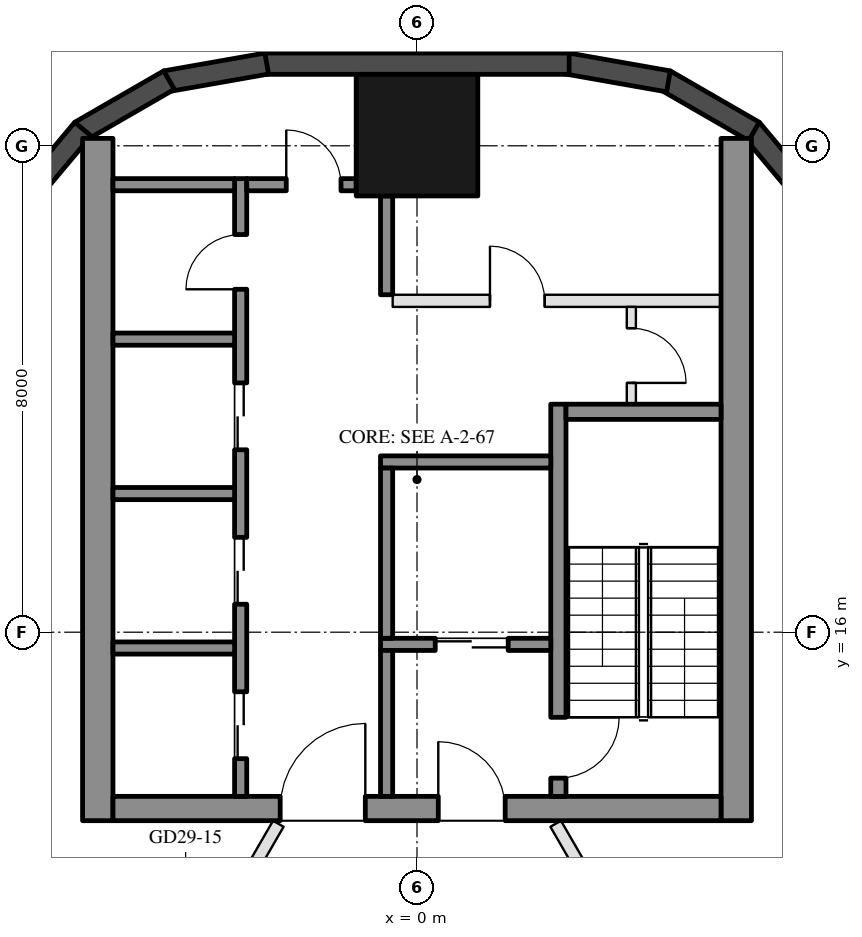
"""IFC4 building model, lengths in metres.
Left out: names, types, materials, properties, quantities, classifications, styles, units other than length and angle.
Written with IfcOpenShell. Run it as: python <this file> out.ifc"""

import sys

from ifc_helpers import new_model, si_unit, direction, frame, frame_2d, origin, origin_2d, place, context, subcontext, project, spatial, rectangle, hollow_rectangle, extrude, boolean, halfspace, element, fill, save


model = new_model("IFC4")
c1 = context("Model", 3, precision=1e-05, world=origin(), true_north=direction((0.0, 1.0)))
c2 = subcontext(c1, "Body", "Model", "MODEL_VIEW")
j1 = project(units=[si_unit("LENGTHUNIT", "METRE"), si_unit("PLANEANGLEUNIT", "RADIAN")], contexts=[c1])
p1 = place(None, origin())
s1 = spatial("IfcSite", under=j1, at=p1, CompositionType="ELEMENT")
p2 = place(p1, origin())
s2 = spatial("IfcBuilding", under=s1, at=p2, CompositionType="ELEMENT")
p3 = place(p2, frame((0.0, 0.0, 291.1)))
s3 = spatial("IfcBuildingStorey", under=s2, at=p3, CompositionType="ELEMENT", Elevation=291.1)
p4 = place(p3, frame((0.0, 24.175, 0.0), z_axis=(0.0, 0.0, 1.0), x_axis=(1.0, 0.0, 0.0)))
e1 = element("IfcColumn", 1, at=p4, inside=s3, PredefinedType="COLUMN", context=c2, shape_type="SweptSolid", body=[
    boolean("DIFFERENCE", extrude(hollow_rectangle(XDim=2.0, YDim=2.0, WallThickness=0.05, at=origin_2d()), origin(), (0.0, 0.0, 1.0), 3.7), halfspace(frame((0.0, 0.0, 0.113), z_axis=(0.0, 0.0, 1.0), x_axis=(1.0, 0.0, 0.0)), True)),
])
for number, where, z_axis, x_axis in (
    (2, (6.581, 22.98, 0.0), (0.0, 0.0, 1.0), (-0.643, 0.766, 0.0)),
    (3, (5.542, 24.236, 0.0), (0.0, 0.0, 1.0), (-0.866, 0.5, 0.0)),
    (4, (4.135, 25.059, 0.0), (0.0, 0.0, 1.0), (-0.985, 0.174, 0.0)),
):
    element("IfcWall", number, at=place(p3, frame(where, z_axis=z_axis, x_axis=x_axis)), inside=s3, PredefinedType="SOLIDWALL", context=c2, shape_type="SweptSolid", body=[
        extrude(rectangle(XDim=1.689, YDim=0.35, at=frame_2d((0.845, 0.0))), origin(), (0.0, 0.0, 1.0), 3.55),
    ])
p5 = place(p3, frame((2.502, 25.35, 0.0), z_axis=(0.0, 0.0, 1.0), x_axis=(-1.0, 0.0, 0.0)))
e5 = element("IfcWall", 5, at=p5, inside=s3, PredefinedType="SOLIDWALL", context=c2, shape_type="SweptSolid", body=[
    extrude(rectangle(XDim=5.004, YDim=0.35, at=frame_2d((2.502, 0.0))), origin(), (0.0, 0.0, 1.0), 3.55),
])
for number, where, z_axis, x_axis in (
    (6, (-2.472, 25.353, 0.0), (0.0, 0.0, 1.0), (-0.985, -0.174, 0.0)),
    (7, (-4.078, 25.08, 0.0), (0.0, 0.0, 1.0), (-0.866, -0.5, 0.0)),
    (8, (-5.495, 24.274, 0.0), (0.0, 0.0, 1.0), (-0.643, -0.766, 0.0)),
):
    element("IfcWall", number, at=place(p3, frame(where, z_axis=z_axis, x_axis=x_axis)), inside=s3, PredefinedType="SOLIDWALL", context=c2, shape_type="SweptSolid", body=[
        extrude(rectangle(XDim=1.689, YDim=0.35, at=frame_2d((0.845, 0.0))), origin(), (0.0, 0.0, 1.0), 3.55),
    ])
for number, where, z_axis, x_axis in (
    (9, (5.25, 12.9, 0.0), (0.0, 0.0, 1.0), (0.0, 1.0, 0.0)),
    (10, (-5.25, 12.9, 0.0), (0.0, 0.0, 1.0), (0.0, 1.0, 0.0)),
):
    element("IfcWall", number, at=place(p3, frame(where, z_axis=z_axis, x_axis=x_axis)), inside=s3, PredefinedType="SHEAR", context=c2, shape_type="SweptSolid", body=[
        extrude(rectangle(XDim=11.222, YDim=0.5, at=frame_2d((5.611, 0.0))), origin(), (0.0, 0.0, 1.0), 3.5),
    ])
p6 = place(p3, frame((5.0, 13.1, 0.0), z_axis=(0.0, 0.0, 1.0), x_axis=(-1.0, 0.0, 0.0)))
e11 = element("IfcWall", 11, at=p6, inside=s3, PredefinedType="SHEAR", context=c2, shape_type="SweptSolid", body=[
    extrude(rectangle(XDim=10.0, YDim=0.4, at=frame_2d((5.0, 0.0))), origin(), (0.0, 0.0, 1.0), 3.5),
])
p7 = place(p6, frame((3.55, 0.0, 0.0)))
e12 = element("IfcOpeningElement", 12, at=p7, cuts=e11, PredefinedType="OPENING", context=c2, shape_type="SweptSolid", body=[
    extrude(rectangle(XDim=1.1, YDim=2.1, at=frame_2d((0.55, 1.05))), frame((0.0, 0.21, 0.0), z_axis=(0.0, -1.0, 0.0), x_axis=(1.0, 0.0, 0.0)), (0.0, 0.0, 1.0), 0.42),
])
p8 = place(p6, frame((5.85, 0.0, 0.0)))
e13 = element("IfcOpeningElement", 13, at=p8, cuts=e11, PredefinedType="OPENING", context=c2, shape_type="SweptSolid", body=[
    extrude(rectangle(XDim=1.4, YDim=2.1, at=frame_2d((0.7, 1.05))), frame((0.0, 0.21, 0.0), z_axis=(0.0, -1.0, 0.0), x_axis=(1.0, 0.0, 0.0)), (0.0, 0.0, 1.0), 0.42),
])
p9 = place(p3, frame((2.325, 13.3, 0.0), z_axis=(0.0, 0.0, 1.0), x_axis=(0.0, 1.0, 0.0)))
e14 = element("IfcWall", 14, at=p9, inside=s3, PredefinedType="SHEAR", context=c2, shape_type="SweptSolid", body=[
    extrude(rectangle(XDim=6.45, YDim=0.25, at=frame_2d((3.225, 0.0))), origin(), (0.0, 0.0, 1.0), 3.5),
])
p10 = place(p9, frame((0.3, 0.0, 0.0)))
e15 = element("IfcOpeningElement", 15, at=p10, cuts=e14, PredefinedType="OPENING", context=c2, shape_type="SweptSolid", body=[
    extrude(rectangle(XDim=1.0, YDim=2.1, at=frame_2d((0.5, 1.05))), frame((0.0, 0.135, 0.0), z_axis=(0.0, -1.0, 0.0), x_axis=(1.0, 0.0, 0.0)), (0.0, 0.0, 1.0), 0.27),
])
p11 = place(p3, frame((5.0, 19.625, 0.0), z_axis=(0.0, 0.0, 1.0), x_axis=(-1.0, 0.0, 0.0)))
e16 = element("IfcWall", 16, at=p11, inside=s3, PredefinedType="SHEAR", context=c2, shape_type="SweptSolid", body=[
    extrude(rectangle(XDim=2.55, YDim=0.25, at=frame_2d((1.275, 0.0))), origin(), (0.0, 0.0, 1.0), 3.5),
])
p12 = place(p3, frame((2.2, 18.8, 0.0), z_axis=(0.0, 0.0, 1.0), x_axis=(-1.0, 0.0, 0.0)))
e17 = element("IfcWall", 17, at=p12, inside=s3, PredefinedType="SHEAR", context=c2, shape_type="SweptSolid", body=[
    extrude(rectangle(XDim=2.8, YDim=0.2, at=frame_2d((1.4, 0.0))), origin(), (0.0, 0.0, 1.0), 3.5),
])
p13 = place(p3, frame((2.2, 15.8, 0.0), z_axis=(0.0, 0.0, 1.0), x_axis=(-1.0, 0.0, 0.0)))
e18 = element("IfcWall", 18, at=p13, inside=s3, PredefinedType="SHEAR", context=c2, shape_type="SweptSolid", body=[
    extrude(rectangle(XDim=2.8, YDim=0.2, at=frame_2d((1.4, 0.0))), origin(), (0.0, 0.0, 1.0), 3.5),
])
p14 = place(p13, frame((0.7, 0.0, 0.0)))
e19 = element("IfcOpeningElement", 19, at=p14, cuts=e18, PredefinedType="OPENING", context=c2, shape_type="SweptSolid", body=[
    extrude(rectangle(XDim=1.2, YDim=2.1, at=frame_2d((0.6, 1.05))), frame((0.0, 0.11, 0.0), z_axis=(0.0, -1.0, 0.0), x_axis=(1.0, 0.0, 0.0)), (0.0, 0.0, 1.0), 0.22),
])
p15 = place(p3, frame((-0.5, 15.9, 0.0), z_axis=(0.0, 0.0, 1.0), x_axis=(0.0, 1.0, 0.0)))
e20 = element("IfcWall", 20, at=p15, inside=s3, PredefinedType="SHEAR", context=c2, shape_type="SweptSolid", body=[
    extrude(rectangle(XDim=2.8, YDim=0.2, at=frame_2d((1.4, 0.0))), origin(), (0.0, 0.0, 1.0), 3.5),
])
p16 = place(p3, frame((-0.5, 13.3, 0.0), z_axis=(0.0, 0.0, 1.0), x_axis=(0.0, 1.0, 0.0)))
e21 = element("IfcWall", 21, at=p16, inside=s3, PredefinedType="SHEAR", context=c2, shape_type="SweptSolid", body=[
    extrude(rectangle(XDim=2.4, YDim=0.2, at=frame_2d((1.2, 0.0))), origin(), (0.0, 0.0, 1.0), 3.5),
])
p17 = place(p3, frame((-2.9, 13.3, 0.0), z_axis=(0.0, 0.0, 1.0), x_axis=(0.0, 1.0, 0.0)))
e22 = element("IfcWall", 22, at=p17, inside=s3, PredefinedType="SHEAR", context=c2, shape_type="SweptSolid", body=[
    extrude(rectangle(XDim=10.16, YDim=0.2, at=frame_2d((5.08, 0.0))), origin(), (0.0, 0.0, 1.0), 3.5),
])
p18 = place(p17, frame((0.62, 0.0, 0.0)))
e23 = element("IfcOpeningElement", 23, at=p18, cuts=e22, PredefinedType="OPENING", context=c2, shape_type="SweptSolid", body=[
    extrude(rectangle(XDim=1.1, YDim=2.1, at=frame_2d((0.55, 1.05))), frame((0.0, 0.11, 0.0), z_axis=(0.0, -1.0, 0.0), x_axis=(1.0, 0.0, 0.0)), (0.0, 0.0, 1.0), 0.22),
])
p19 = place(p17, frame((3.16, 0.0, 0.0)))
e24 = element("IfcOpeningElement", 24, at=p19, cuts=e22, PredefinedType="OPENING", context=c2, shape_type="SweptSolid", body=[
    extrude(rectangle(XDim=1.1, YDim=2.1, at=frame_2d((0.55, 1.05))), frame((0.0, 0.11, 0.0), z_axis=(0.0, -1.0, 0.0), x_axis=(1.0, 0.0, 0.0)), (0.0, 0.0, 1.0), 0.22),
])
p20 = place(p17, frame((5.7, 0.0, 0.0)))
e25 = element("IfcOpeningElement", 25, at=p20, cuts=e22, PredefinedType="OPENING", context=c2, shape_type="SweptSolid", body=[
    extrude(rectangle(XDim=1.1, YDim=2.1, at=frame_2d((0.55, 1.05))), frame((0.0, 0.11, 0.0), z_axis=(0.0, -1.0, 0.0), x_axis=(1.0, 0.0, 0.0)), (0.0, 0.0, 1.0), 0.22),
])
p21 = place(p17, frame((8.34, 0.0, 0.0)))
e26 = element("IfcOpeningElement", 26, at=p21, cuts=e22, PredefinedType="OPENING", context=c2, shape_type="SweptSolid", body=[
    extrude(rectangle(XDim=0.9, YDim=2.1, at=frame_2d((0.45, 1.05))), frame((0.0, 0.11, 0.0), z_axis=(0.0, -1.0, 0.0), x_axis=(1.0, 0.0, 0.0)), (0.0, 0.0, 1.0), 0.22),
])
p22 = place(p3, frame((-1.0, 23.36, 0.0), z_axis=(0.0, 0.0, 1.0), x_axis=(-1.0, 0.0, 0.0)))
e27 = element("IfcWall", 27, at=p22, inside=s3, PredefinedType="SHEAR", context=c2, shape_type="SweptSolid", body=[
    extrude(rectangle(XDim=1.8, YDim=0.2, at=frame_2d((0.9, 0.0))), origin(), (0.0, 0.0, 1.0), 3.5),
])
p23 = place(p22, frame((0.25, 0.0, 0.0)))
e28 = element("IfcOpeningElement", 28, at=p23, cuts=e27, PredefinedType="OPENING", context=c2, shape_type="SweptSolid", body=[
    extrude(rectangle(XDim=0.9, YDim=2.1, at=frame_2d((0.45, 1.05))), frame((0.0, 0.11, 0.0), z_axis=(0.0, -1.0, 0.0), x_axis=(1.0, 0.0, 0.0)), (0.0, 0.0, 1.0), 0.22),
])
p24 = place(p3, frame((-0.5, 21.55, 0.0), z_axis=(0.0, 0.0, 1.0), x_axis=(0.0, 1.0, 0.0)))
e29 = element("IfcWall", 29, at=p24, inside=s3, PredefinedType="SHEAR", context=c2, shape_type="SweptSolid", body=[
    extrude(rectangle(XDim=1.625, YDim=0.2, at=frame_2d((0.812, 0.0))), origin(), (0.0, 0.0, 1.0), 3.5),
])
for number, where, z_axis, x_axis in (
    (30, (-3.0, 15.74, 0.0), (0.0, 0.0, 1.0), (-1.0, 0.0, 0.0)),
    (31, (-3.0, 18.28, 0.0), (0.0, 0.0, 1.0), (-1.0, 0.0, 0.0)),
    (32, (-3.0, 20.82, 0.0), (0.0, 0.0, 1.0), (-1.0, 0.0, 0.0)),
    (33, (-3.0, 23.36, 0.0), (0.0, 0.0, 1.0), (-1.0, 0.0, 0.0)),
):
    element("IfcWall", number, at=place(p3, frame(where, z_axis=z_axis, x_axis=x_axis)), inside=s3, PredefinedType="SHEAR", context=c2, shape_type="SweptSolid", body=[
        extrude(rectangle(XDim=2.0, YDim=0.2, at=frame_2d((1.0, 0.0))), origin(), (0.0, 0.0, 1.0), 3.5),
    ])
p25 = place(p3, frame((5.0, 21.45, 0.0), z_axis=(0.0, 0.0, 1.0), x_axis=(-1.0, 0.0, 0.0)))
e34 = element("IfcWall", 34, at=p25, inside=s3, PredefinedType="PARTITIONING", context=c2, shape_type="SweptSolid", body=[
    extrude(rectangle(XDim=5.4, YDim=0.2, at=frame_2d((2.7, 0.0))), origin(), (0.0, 0.0, 1.0), 3.5),
])
p26 = place(p25, frame((2.9, 0.0, 0.0)))
e35 = element("IfcOpeningElement", 35, at=p26, cuts=e34, PredefinedType="OPENING", context=c2, shape_type="SweptSolid", body=[
    extrude(rectangle(XDim=0.9, YDim=2.1, at=frame_2d((0.45, 1.05))), frame((0.0, 0.11, 0.0), z_axis=(0.0, -1.0, 0.0), x_axis=(1.0, 0.0, 0.0)), (0.0, 0.0, 1.0), 0.22),
])
p27 = place(p3, frame((3.525, 19.75, 0.0), z_axis=(0.0, 0.0, 1.0), x_axis=(0.0, 1.0, 0.0)))
e36 = element("IfcWall", 36, at=p27, inside=s3, PredefinedType="PARTITIONING", context=c2, shape_type="SweptSolid", body=[
    extrude(rectangle(XDim=1.6, YDim=0.15, at=frame_2d((0.8, 0.0))), origin(), (0.0, 0.0, 1.0), 3.5),
])
p28 = place(p27, frame((0.35, 0.0, 0.0)))
e37 = element("IfcOpeningElement", 37, at=p28, cuts=e36, PredefinedType="OPENING", context=c2, shape_type="SweptSolid", body=[
    extrude(rectangle(XDim=0.9, YDim=2.1, at=frame_2d((0.45, 1.05))), frame((0.0, 0.085, 0.0), z_axis=(0.0, -1.0, 0.0), x_axis=(1.0, 0.0, 0.0)), (0.0, 0.0, 1.0), 0.17),
])
p29 = place(p3, frame((-10.302, 13.698, 0.0), z_axis=(0.0, 0.0, 1.0), x_axis=(0.737268015828, -0.675600379541, 0.0)))
e38 = element("IfcWall", 38, at=p29, inside=s3, PredefinedType="PARTITIONING", context=c2, shape_type="SweptSolid", body=[
    extrude(rectangle(XDim=7.653, YDim=0.2, at=frame_2d((3.826, 0.0))), origin(), (0.0, 0.0, 1.0), 3.55),
])
p30 = place(p3, frame((2.281, 12.85, 0.0), z_axis=(0.0, 0.0, 1.0), x_axis=(0.500002143212, -0.866024166397, 0.0)))
e39 = element("IfcWall", 39, at=p30, inside=s3, PredefinedType="PARTITIONING", context=c2, shape_type="SweptSolid", body=[
    extrude(rectangle(XDim=11.888, YDim=0.2, at=frame_2d((5.944, 0.0))), origin(), (0.0, 0.0, 1.0), 3.05),
])
p31 = place(p30, frame((8.438, 0.0, 0.0)))
e40 = element("IfcOpeningElement", 40, at=p31, cuts=e39, PredefinedType="OPENING", context=c2, shape_type="SweptSolid", body=[
    extrude(rectangle(XDim=1.0, YDim=2.1, at=frame_2d((0.5, 1.05))), frame((0.0, 0.11, 0.0), z_axis=(0.0, -1.0, 0.0), x_axis=(1.0, 0.0, 0.0)), (0.0, 0.0, 1.0), 0.22),
])
p32 = place(p3, frame((-4.685, 8.686, 0.0), z_axis=(0.0, 0.0, 1.0), x_axis=(0.500011088314, 0.866019001848, 0.0)))
e41 = element("IfcWall", 41, at=p32, inside=s3, PredefinedType="PARTITIONING", context=c2, shape_type="SweptSolid", body=[
    extrude(rectangle(XDim=4.808, YDim=0.2, at=frame_2d((2.404, 0.0))), origin(), (0.0, 0.0, 1.0), 3.05),
])
p33 = place(p32, frame((2.472, 0.0, 0.0)))
e42 = element("IfcOpeningElement", 42, at=p33, cuts=e41, PredefinedType="OPENING", context=c2, shape_type="SweptSolid", body=[
    extrude(rectangle(XDim=1.0, YDim=2.1, at=frame_2d((0.5, 1.05))), frame((0.0, 0.11, 0.0), z_axis=(0.0, -1.0, 0.0), x_axis=(1.0, 0.0, 0.0)), (0.0, 0.0, 1.0), 0.22),
])
p34 = place(p14, origin())
e43 = element("IfcDoor", 43, at=p34, inside=s3, OperationType="DOUBLE_DOOR_SLIDING", PredefinedType="DOOR", context=c2, shape_type="SweptSolid", body=[
    extrude(rectangle(XDim=1.2, YDim=2.1, at=frame_2d((0.6, 1.05))), frame((0.0, 0.025, 0.0), z_axis=(0.0, -1.0, 0.0), x_axis=(1.0, 0.0, 0.0)), (0.0, 0.0, 1.0), 0.05),
])
fill(e19, e43)
p35 = place(p28, frame((0.9, 0.0, 0.0), z_axis=(0.0, 0.0, 1.0), x_axis=(-1.0, 0.0, 0.0)))
e44 = element("IfcDoor", 44, at=p35, inside=s3, OperationType="SINGLE_SWING_RIGHT", PredefinedType="DOOR", context=c2, shape_type="SweptSolid", body=[
    extrude(rectangle(XDim=0.9, YDim=2.1, at=frame_2d((0.45, 1.05))), frame((0.0, 0.025, 0.0), z_axis=(0.0, -1.0, 0.0), x_axis=(1.0, 0.0, 0.0)), (0.0, 0.0, 1.0), 0.05),
])
fill(e37, e44)
p36 = place(p18, origin())
e45 = element("IfcDoor", 45, at=p36, inside=s3, OperationType="DOUBLE_DOOR_SLIDING", PredefinedType="DOOR", context=c2, shape_type="SweptSolid", body=[
    extrude(rectangle(XDim=1.1, YDim=2.1, at=frame_2d((0.55, 1.05))), frame((0.0, 0.025, 0.0), z_axis=(0.0, -1.0, 0.0), x_axis=(1.0, 0.0, 0.0)), (0.0, 0.0, 1.0), 0.05),
])
fill(e23, e45)
p37 = place(p19, origin())
e46 = element("IfcDoor", 46, at=p37, inside=s3, OperationType="DOUBLE_DOOR_SLIDING", PredefinedType="DOOR", context=c2, shape_type="SweptSolid", body=[
    extrude(rectangle(XDim=1.1, YDim=2.1, at=frame_2d((0.55, 1.05))), frame((0.0, 0.025, 0.0), z_axis=(0.0, -1.0, 0.0), x_axis=(1.0, 0.0, 0.0)), (0.0, 0.0, 1.0), 0.05),
])
fill(e24, e46)
p38 = place(p20, origin())
e47 = element("IfcDoor", 47, at=p38, inside=s3, OperationType="DOUBLE_DOOR_SLIDING", PredefinedType="DOOR", context=c2, shape_type="SweptSolid", body=[
    extrude(rectangle(XDim=1.1, YDim=2.1, at=frame_2d((0.55, 1.05))), frame((0.0, 0.025, 0.0), z_axis=(0.0, -1.0, 0.0), x_axis=(1.0, 0.0, 0.0)), (0.0, 0.0, 1.0), 0.05),
])
fill(e25, e47)
p39 = place(p21, origin())
e48 = element("IfcDoor", 48, at=p39, inside=s3, OperationType="SINGLE_SWING_LEFT", PredefinedType="DOOR", context=c2, shape_type="SweptSolid", body=[
    extrude(rectangle(XDim=0.9, YDim=2.1, at=frame_2d((0.45, 1.05))), frame((0.0, 0.025, 0.0), z_axis=(0.0, -1.0, 0.0), x_axis=(1.0, 0.0, 0.0)), (0.0, 0.0, 1.0), 0.05),
])
fill(e26, e48)
p40 = place(p23, frame((0.9, 0.0, 0.0), z_axis=(0.0, 0.0, 1.0), x_axis=(-1.0, 0.0, 0.0)))
e49 = element("IfcDoor", 49, at=p40, inside=s3, OperationType="SINGLE_SWING_LEFT", PredefinedType="DOOR", context=c2, shape_type="SweptSolid", body=[
    extrude(rectangle(XDim=0.9, YDim=2.1, at=frame_2d((0.45, 1.05))), frame((0.0, 0.025, 0.0), z_axis=(0.0, -1.0, 0.0), x_axis=(1.0, 0.0, 0.0)), (0.0, 0.0, 1.0), 0.05),
])
fill(e28, e49)
p41 = place(p26, frame((0.9, 0.0, 0.0), z_axis=(0.0, 0.0, 1.0), x_axis=(-1.0, 0.0, 0.0)))
e50 = element("IfcDoor", 50, at=p41, inside=s3, OperationType="SINGLE_SWING_LEFT", PredefinedType="DOOR", context=c2, shape_type="SweptSolid", body=[
    extrude(rectangle(XDim=0.9, YDim=2.1, at=frame_2d((0.45, 1.05))), frame((0.0, 0.025, 0.0), z_axis=(0.0, -1.0, 0.0), x_axis=(1.0, 0.0, 0.0)), (0.0, 0.0, 1.0), 0.05),
])
fill(e35, e50)
p42 = place(p7, frame((1.1, 0.0, 0.0), z_axis=(0.0, 0.0, 1.0), x_axis=(-1.0, 0.0, 0.0)))
e51 = element("IfcDoor", 51, at=p42, inside=s3, OperationType="SINGLE_SWING_LEFT", PredefinedType="DOOR", context=c2, shape_type="SweptSolid", body=[
    extrude(rectangle(XDim=1.1, YDim=2.1, at=frame_2d((0.55, 1.05))), frame((0.0, 0.025, 0.0), z_axis=(0.0, -1.0, 0.0), x_axis=(1.0, 0.0, 0.0)), (0.0, 0.0, 1.0), 0.05),
])
fill(e12, e51)
p43 = place(p8, frame((1.4, 0.0, 0.0), z_axis=(0.0, 0.0, 1.0), x_axis=(-1.0, 0.0, 0.0)))
e52 = element("IfcDoor", 52, at=p43, inside=s3, OperationType="DOUBLE_DOOR_SINGLE_SWING", PredefinedType="DOOR", context=c2, shape_type="SweptSolid", body=[
    extrude(rectangle(XDim=1.4, YDim=2.1, at=frame_2d((0.7, 1.05))), frame((0.0, 0.025, 0.0), z_axis=(0.0, -1.0, 0.0), x_axis=(1.0, 0.0, 0.0)), (0.0, 0.0, 1.0), 0.05),
])
fill(e13, e52)
p44 = place(p10, frame((1.0, 0.0, 0.0), z_axis=(0.0, 0.0, 1.0), x_axis=(-1.0, 0.0, 0.0)))
e53 = element("IfcDoor", 53, at=p44, inside=s3, OperationType="SINGLE_SWING_LEFT", PredefinedType="DOOR", context=c2, shape_type="SweptSolid", body=[
    extrude(rectangle(XDim=1.0, YDim=2.1, at=frame_2d((0.5, 1.05))), frame((0.0, 0.025, 0.0), z_axis=(0.0, -1.0, 0.0), x_axis=(1.0, 0.0, 0.0)), (0.0, 0.0, 1.0), 0.05),
])
fill(e15, e53)
save(model, sys.argv[1])
